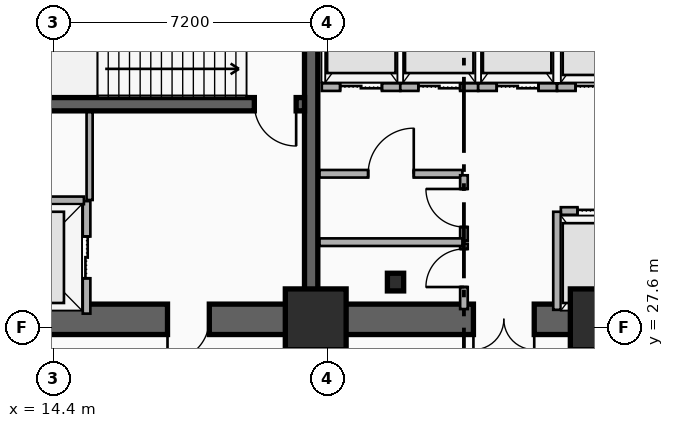
"""IFC4 building model, lengths in metres.
Left out: names, types, materials, properties, quantities, classifications, styles, units other than length and angle.
Written with IfcOpenShell. Run it as: python <this file> out.ifc"""

import sys

from ifc_helpers import new_model, si_unit, direction, frame, frame_2d, origin, origin_2d, place, context, subcontext, project, spatial, rectangle, i_section, extrude, element, fill, save


model = new_model("IFC4")
c1 = context("Model", 3, precision=1e-05, world=origin(), true_north=direction((0.0, 1.0)))
c2 = subcontext(c1, "Body", "Model", "MODEL_VIEW")
j1 = project(units=[si_unit("LENGTHUNIT", "METRE"), si_unit("PLANEANGLEUNIT", "RADIAN")], contexts=[c1])
p1 = place(None, origin())
s1 = spatial("IfcSite", under=j1, at=p1, CompositionType="ELEMENT")
p2 = place(p1, origin())
s2 = spatial("IfcBuilding", under=s1, at=p2, CompositionType="ELEMENT")
p3 = place(p2, origin())
s3 = spatial("IfcBuildingStorey", under=s2, at=p3, CompositionType="ELEMENT", Elevation=0.0)
p4 = place(p3, frame((21.18, 27.82, 0.0), z_axis=(0.0, 0.0, 1.0), x_axis=(-1.0, 0.0, 0.0)))
e1 = element("IfcWall", 1, at=p4, inside=s3, PredefinedType="SHEAR", context=c2, shape_type="SweptSolid", body=[
    extrude(rectangle(XDim=9.03, YDim=0.8, at=frame_2d((4.515, 0.0))), origin(), (0.0, 0.0, 1.0), 5.4),
])
p5 = place(p4, frame((2.68, 0.0, 0.0)))
e2 = element("IfcOpeningElement", 2, at=p5, cuts=e1, PredefinedType="OPENING", context=c2, shape_type="SweptSolid", body=[
    extrude(rectangle(XDim=1.1, YDim=2.15, at=frame_2d((0.55, 1.075))), frame((0.0, 0.41, 0.0), z_axis=(0.0, -1.0, 0.0), x_axis=(1.0, 0.0, 0.0)), (0.0, 0.0, 1.0), 0.82),
])
p6 = place(p3, frame((33.15, 27.82, 0.0), z_axis=(0.0, 0.0, 1.0), x_axis=(-1.0, 0.0, 0.0)))
e3 = element("IfcWall", 3, at=p6, inside=s3, PredefinedType="SHEAR", context=c2, shape_type="SweptSolid", body=[
    extrude(rectangle(XDim=11.97, YDim=0.8, at=frame_2d((5.985, 0.0))), origin(), (0.0, 0.0, 1.0), 5.4),
])
p7 = place(p6, frame((6.1, 0.0, 0.0)))
e4 = element("IfcOpeningElement", 4, at=p7, cuts=e3, PredefinedType="OPENING", context=c2, shape_type="SweptSolid", body=[
    extrude(rectangle(XDim=1.6, YDim=2.2, at=frame_2d((0.8, 1.1))), frame((0.0, 0.41, 0.0), z_axis=(0.0, -1.0, 0.0), x_axis=(1.0, 0.0, 0.0)), (0.0, 0.0, 1.0), 0.82),
])
p8 = place(p3, frame((21.18, 28.22, 0.0), z_axis=(0.0, 0.0, 1.0), x_axis=(0.0, 1.0, 0.0)))
e5 = element("IfcWall", 5, at=p8, inside=s3, PredefinedType="SHEAR", context=c2, shape_type="SweptSolid", body=[
    extrude(rectangle(XDim=8.43, YDim=0.35, at=frame_2d((4.215, 0.0))), origin(), (0.0, 0.0, 1.0), 5.4),
])
p9 = place(p3, frame((21.005, 33.48, 0.0), z_axis=(0.0, 0.0, 1.0), x_axis=(-1.0, 0.0, 0.0)))
e6 = element("IfcWall", 6, at=p9, inside=s3, PredefinedType="SHEAR", context=c2, shape_type="SweptSolid", body=[
    extrude(rectangle(XDim=8.455, YDim=0.35, at=frame_2d((4.228, 0.0))), origin(), (0.0, 0.0, 1.0), 5.4),
])
p10 = place(p9, frame((0.22, 0.0, 0.0)))
e7 = element("IfcOpeningElement", 7, at=p10, cuts=e6, PredefinedType="OPENING", context=c2, shape_type="SweptSolid", body=[
    extrude(rectangle(XDim=1.1, YDim=2.15, at=frame_2d((0.55, 1.075))), frame((0.0, 0.185, 0.0), z_axis=(0.0, -1.0, 0.0), x_axis=(1.0, 0.0, 0.0)), (0.0, 0.0, 1.0), 0.37),
])
p11 = place(p3, frame((23.4, 28.8, 0.0), z_axis=(0.0, 0.0, 1.0), x_axis=(1.0, 0.0, 0.0)))
e8 = element("IfcColumn", 8, at=p11, inside=s3, PredefinedType="COLUMN", context=c2, shape_type="SweptSolid", body=[
    extrude(i_section(OverallWidth=0.428, OverallDepth=0.465, WebThickness=0.045, FlangeThickness=0.073, FilletRadius=0.015, at=origin_2d()), origin(), (0.0, 0.0, 1.0), 5.4),
])
for number, where, z_axis, x_axis in (
    (9, (21.3, 27.82, 0.0), (0.0, 0.0, 1.0), (1.0, 0.0, 0.0)),
    (10, (28.8, 27.82, 0.0), (0.0, 0.0, 1.0), (1.0, 0.0, 0.0)),
):
    element("IfcColumn", number, at=place(p3, frame(where, z_axis=z_axis, x_axis=x_axis)), inside=s3, PredefinedType="COLUMN", context=c2, shape_type="SweptSolid", body=[
        extrude(rectangle(XDim=1.6, YDim=1.6, at=origin_2d()), origin(), (0.0, 0.0, 1.0), 5.4),
    ])
p12 = place(p3, frame((15.27, 27.97, 0.0), z_axis=(0.0, 0.0, 1.0), x_axis=(0.0, 1.0, 0.0)))
e11 = element("IfcWall", 11, at=p12, inside=s3, PredefinedType="PARTITIONING", context=c2, shape_type="SweptSolid", body=[
    extrude(rectangle(XDim=2.96, YDim=0.2, at=frame_2d((1.48, 0.0))), origin(), (0.0, 0.0, 1.0), 4.072),
])
p13 = place(p12, frame((0.93, 0.0, 0.0)))
e12 = element("IfcOpeningElement", 12, at=p13, cuts=e11, PredefinedType="OPENING", context=c2, shape_type="SweptSolid", body=[
    extrude(rectangle(XDim=1.1, YDim=2.15, at=frame_2d((0.55, 1.075))), frame((0.0, 0.11, 0.0), z_axis=(0.0, -1.0, 0.0), x_axis=(1.0, 0.0, 0.0)), (0.0, 0.0, 1.0), 0.22),
])
p14 = place(p3, frame((12.45, 30.95, 0.0), z_axis=(0.0, 0.0, 1.0), x_axis=(1.0, 0.0, 0.0)))
e13 = element("IfcWall", 13, at=p14, inside=s3, PredefinedType="PARTITIONING", context=c2, shape_type="SweptSolid", body=[
    extrude(rectangle(XDim=2.75, YDim=0.2, at=frame_2d((1.375, 0.0))), origin(), (0.0, 0.0, 1.0), 4.072),
])
p15 = place(p3, frame((27.75, 30.67, 0.0), z_axis=(0.0, 0.0, 1.0), x_axis=(1.0, 0.0, 0.0)))
e14 = element("IfcWall", 14, at=p15, inside=s3, PredefinedType="PARTITIONING", context=c2, shape_type="SweptSolid", body=[
    extrude(rectangle(XDim=1.975, YDim=0.2, at=frame_2d((0.988, 0.0))), origin(), (0.0, 0.0, 1.0), 4.072),
])
p16 = place(p15, frame((0.438, 0.0, 0.0)))
e15 = element("IfcOpeningElement", 15, at=p16, cuts=e14, PredefinedType="OPENING", context=c2, shape_type="SweptSolid", body=[
    extrude(rectangle(XDim=1.1, YDim=2.15, at=frame_2d((0.55, 1.075))), frame((0.0, 0.11, 0.0), z_axis=(0.0, -1.0, 0.0), x_axis=(1.0, 0.0, 0.0)), (0.0, 0.0, 1.0), 0.22),
])
p17 = place(p3, frame((27.65, 28.07, 0.0), z_axis=(0.0, 0.0, 1.0), x_axis=(0.0, 1.0, 0.0)))
e16 = element("IfcWall", 16, at=p17, inside=s3, PredefinedType="PARTITIONING", context=c2, shape_type="SweptSolid", body=[
    extrude(rectangle(XDim=2.58, YDim=0.2, at=frame_2d((1.29, 0.0))), origin(), (0.0, 0.0, 1.0), 4.072),
])
p18 = place(p3, frame((21.46, 33.93, 0.0), z_axis=(0.0, 0.0, 1.0), x_axis=(1.0, 0.0, 0.0)))
e17 = element("IfcWall", 17, at=p18, inside=s3, PredefinedType="PARTITIONING", context=c2, shape_type="SweptSolid", body=[
    extrude(rectangle(XDim=2.065, YDim=0.2, at=frame_2d((1.032, 0.0))), origin(), (0.0, 0.0, 1.0), 4.072),
])
p19 = place(p18, frame((0.482, 0.0, 0.0)))
e18 = element("IfcOpeningElement", 18, at=p19, cuts=e17, PredefinedType="OPENING", context=c2, shape_type="SweptSolid", body=[
    extrude(rectangle(XDim=1.1, YDim=2.15, at=frame_2d((0.55, 1.075))), frame((0.0, 0.11, 0.0), z_axis=(0.0, -1.0, 0.0), x_axis=(1.0, 0.0, 0.0)), (0.0, 0.0, 1.0), 0.22),
])
p20 = place(p3, frame((23.525, 33.93, 0.0), z_axis=(0.0, 0.0, 1.0), x_axis=(1.0, 0.0, 0.0)))
e19 = element("IfcWall", 19, at=p20, inside=s3, PredefinedType="PARTITIONING", context=c2, shape_type="SweptSolid", body=[
    extrude(rectangle(XDim=2.05, YDim=0.2, at=frame_2d((1.025, 0.0))), origin(), (0.0, 0.0, 1.0), 5.1),
])
p21 = place(p20, frame((0.475, 0.0, 0.0)))
e20 = element("IfcOpeningElement", 20, at=p21, cuts=e19, PredefinedType="OPENING", context=c2, shape_type="SweptSolid", body=[
    extrude(rectangle(XDim=1.1, YDim=2.15, at=frame_2d((0.55, 1.075))), frame((0.0, 0.11, 0.0), z_axis=(0.0, -1.0, 0.0), x_axis=(1.0, 0.0, 0.0)), (0.0, 0.0, 1.0), 0.22),
])
p22 = place(p3, frame((25.575, 33.93, 0.0), z_axis=(0.0, 0.0, 1.0), x_axis=(1.0, 0.0, 0.0)))
e21 = element("IfcWall", 21, at=p22, inside=s3, PredefinedType="PARTITIONING", context=c2, shape_type="SweptSolid", body=[
    extrude(rectangle(XDim=2.075, YDim=0.2, at=frame_2d((1.038, 0.0))), origin(), (0.0, 0.0, 1.0), 5.1),
])
p23 = place(p22, frame((0.488, 0.0, 0.0)))
e22 = element("IfcOpeningElement", 22, at=p23, cuts=e21, PredefinedType="OPENING", context=c2, shape_type="SweptSolid", body=[
    extrude(rectangle(XDim=1.1, YDim=2.15, at=frame_2d((0.55, 1.075))), frame((0.0, 0.11, 0.0), z_axis=(0.0, -1.0, 0.0), x_axis=(1.0, 0.0, 0.0)), (0.0, 0.0, 1.0), 0.22),
])
p24 = place(p3, frame((27.65, 33.93, 0.0), z_axis=(0.0, 0.0, 1.0), x_axis=(1.0, 0.0, 0.0)))
e23 = element("IfcWall", 23, at=p24, inside=s3, PredefinedType="PARTITIONING", context=c2, shape_type="SweptSolid", body=[
    extrude(rectangle(XDim=2.075, YDim=0.2, at=frame_2d((1.038, 0.0))), origin(), (0.0, 0.0, 1.0), 4.072),
])
p25 = place(p24, frame((0.488, 0.0, 0.0)))
e24 = element("IfcOpeningElement", 24, at=p25, cuts=e23, PredefinedType="OPENING", context=c2, shape_type="SweptSolid", body=[
    extrude(rectangle(XDim=1.1, YDim=2.15, at=frame_2d((0.55, 1.075))), frame((0.0, 0.11, 0.0), z_axis=(0.0, -1.0, 0.0), x_axis=(1.0, 0.0, 0.0)), (0.0, 0.0, 1.0), 0.22),
])
p26 = place(p3, frame((21.4, 31.65, 0.0), z_axis=(0.0, 0.0, 1.0), x_axis=(1.0, 0.0, 0.0)))
e25 = element("IfcWall", 25, at=p26, inside=s3, PredefinedType="PARTITIONING", context=c2, shape_type="SweptSolid", body=[
    extrude(rectangle(XDim=3.76, YDim=0.2, at=frame_2d((1.88, 0.0))), origin(), (0.0, 0.0, 1.0), 4.072),
])
p27 = place(p26, frame((1.28, 0.0, 0.0)))
e26 = element("IfcOpeningElement", 26, at=p27, cuts=e25, PredefinedType="OPENING", context=c2, shape_type="SweptSolid", body=[
    extrude(rectangle(XDim=1.2, YDim=2.15, at=frame_2d((0.6, 1.075))), frame((0.0, 0.11, 0.0), z_axis=(0.0, -1.0, 0.0), x_axis=(1.0, 0.0, 0.0)), (0.0, 0.0, 1.0), 0.22),
])
p28 = place(p3, frame((25.2, 28.09, 0.0), z_axis=(0.0, 0.0, 1.0), x_axis=(0.0, 1.0, 0.0)))
e27 = element("IfcWall", 27, at=p28, inside=s3, PredefinedType="PARTITIONING", context=c2, shape_type="SweptSolid", body=[
    extrude(rectangle(XDim=1.72, YDim=0.2, at=frame_2d((0.86, 0.0))), origin(), (0.0, 0.0, 1.0), 5.1),
])
p29 = place(p28, frame((0.58, 0.0, 0.0)))
e28 = element("IfcOpeningElement", 28, at=p29, cuts=e27, PredefinedType="OPENING", context=c2, shape_type="SweptSolid", body=[
    extrude(rectangle(XDim=1.0, YDim=2.15, at=frame_2d((0.5, 1.075))), frame((0.0, 0.11, 0.0), z_axis=(0.0, -1.0, 0.0), x_axis=(1.0, 0.0, 0.0)), (0.0, 0.0, 1.0), 0.22),
])
p30 = place(p3, frame((25.2, 29.89, 0.0), z_axis=(0.0, 0.0, 1.0), x_axis=(0.0, 1.0, 0.0)))
e29 = element("IfcWall", 29, at=p30, inside=s3, PredefinedType="PARTITIONING", context=c2, shape_type="SweptSolid", body=[
    extrude(rectangle(XDim=1.72, YDim=0.2, at=frame_2d((0.86, 0.0))), origin(), (0.0, 0.0, 1.0), 5.1),
])
p31 = place(p30, frame((0.36, 0.0, 0.0)))
e30 = element("IfcOpeningElement", 30, at=p31, cuts=e29, PredefinedType="OPENING", context=c2, shape_type="SweptSolid", body=[
    extrude(rectangle(XDim=1.0, YDim=2.15, at=frame_2d((0.5, 1.075))), frame((0.0, 0.11, 0.0), z_axis=(0.0, -1.0, 0.0), x_axis=(1.0, 0.0, 0.0)), (0.0, 0.0, 1.0), 0.22),
])
p32 = place(p3, frame((21.4, 29.85, 0.0), z_axis=(0.0, 0.0, 1.0), x_axis=(1.0, 0.0, 0.0)))
e31 = element("IfcWall", 31, at=p32, inside=s3, PredefinedType="PARTITIONING", context=c2, shape_type="SweptSolid", body=[
    extrude(rectangle(XDim=3.76, YDim=0.2, at=frame_2d((1.88, 0.0))), origin(), (0.0, 0.0, 1.0), 4.072),
])
p33 = place(p3, frame((15.35, 30.96, 0.0), z_axis=(0.0, 0.0, 1.0), x_axis=(0.0, 1.0, 0.0)))
e32 = element("IfcWall", 32, at=p33, inside=s3, PredefinedType="PARTITIONING", context=c2, shape_type="SweptSolid", body=[
    extrude(rectangle(XDim=2.31, YDim=0.16, at=frame_2d((1.155, 0.0))), origin(), (0.0, 0.0, 1.0), 5.1),
])
p34 = place(p13, origin())
e33 = element("IfcDoor", 33, at=p34, inside=s3, OperationType="DOUBLE_DOOR_SLIDING", PredefinedType="DOOR", context=c2, shape_type="SweptSolid", body=[
    extrude(rectangle(XDim=1.1, YDim=2.15, at=frame_2d((0.55, 1.075))), frame((0.0, 0.025, 0.0), z_axis=(0.0, -1.0, 0.0), x_axis=(1.0, 0.0, 0.0)), (0.0, 0.0, 1.0), 0.05),
])
fill(e12, e33)
p35 = place(p16, origin())
e34 = element("IfcDoor", 34, at=p35, inside=s3, OperationType="DOUBLE_DOOR_SLIDING", PredefinedType="DOOR", context=c2, shape_type="SweptSolid", body=[
    extrude(rectangle(XDim=1.1, YDim=2.15, at=frame_2d((0.55, 1.075))), frame((0.0, 0.025, 0.0), z_axis=(0.0, -1.0, 0.0), x_axis=(1.0, 0.0, 0.0)), (0.0, 0.0, 1.0), 0.05),
])
fill(e15, e34)
p36 = place(p19, origin())
e35 = element("IfcDoor", 35, at=p36, inside=s3, OperationType="DOUBLE_DOOR_SLIDING", PredefinedType="DOOR", context=c2, shape_type="SweptSolid", body=[
    extrude(rectangle(XDim=1.1, YDim=2.15, at=frame_2d((0.55, 1.075))), frame((0.0, 0.025, 0.0), z_axis=(0.0, -1.0, 0.0), x_axis=(1.0, 0.0, 0.0)), (0.0, 0.0, 1.0), 0.05),
])
fill(e18, e35)
p37 = place(p21, origin())
e36 = element("IfcDoor", 36, at=p37, inside=s3, OperationType="DOUBLE_DOOR_SLIDING", PredefinedType="DOOR", context=c2, shape_type="SweptSolid", body=[
    extrude(rectangle(XDim=1.1, YDim=2.15, at=frame_2d((0.55, 1.075))), frame((0.0, 0.025, 0.0), z_axis=(0.0, -1.0, 0.0), x_axis=(1.0, 0.0, 0.0)), (0.0, 0.0, 1.0), 0.05),
])
fill(e20, e36)
p38 = place(p23, origin())
e37 = element("IfcDoor", 37, at=p38, inside=s3, OperationType="DOUBLE_DOOR_SLIDING", PredefinedType="DOOR", context=c2, shape_type="SweptSolid", body=[
    extrude(rectangle(XDim=1.1, YDim=2.15, at=frame_2d((0.55, 1.075))), frame((0.0, 0.025, 0.0), z_axis=(0.0, -1.0, 0.0), x_axis=(1.0, 0.0, 0.0)), (0.0, 0.0, 1.0), 0.05),
])
fill(e22, e37)
p39 = place(p25, origin())
e38 = element("IfcDoor", 38, at=p39, inside=s3, OperationType="DOUBLE_DOOR_SLIDING", PredefinedType="DOOR", context=c2, shape_type="SweptSolid", body=[
    extrude(rectangle(XDim=1.1, YDim=2.15, at=frame_2d((0.55, 1.075))), frame((0.0, 0.025, 0.0), z_axis=(0.0, -1.0, 0.0), x_axis=(1.0, 0.0, 0.0)), (0.0, 0.0, 1.0), 0.05),
])
fill(e24, e38)
p40 = place(p10, origin())
e39 = element("IfcDoor", 39, at=p40, inside=s3, OperationType="SINGLE_SWING_LEFT", PredefinedType="DOOR", context=c2, shape_type="SweptSolid", body=[
    extrude(rectangle(XDim=1.1, YDim=2.15, at=frame_2d((0.55, 1.075))), frame((0.0, 0.025, 0.0), z_axis=(0.0, -1.0, 0.0), x_axis=(1.0, 0.0, 0.0)), (0.0, 0.0, 1.0), 0.05),
])
fill(e7, e39)
p41 = place(p5, origin())
e40 = element("IfcDoor", 40, at=p41, inside=s3, OperationType="SINGLE_SWING_RIGHT", PredefinedType="DOOR", context=c2, shape_type="SweptSolid", body=[
    extrude(rectangle(XDim=1.1, YDim=2.15, at=frame_2d((0.55, 1.075))), frame((0.0, 0.025, 0.0), z_axis=(0.0, -1.0, 0.0), x_axis=(1.0, 0.0, 0.0)), (0.0, 0.0, 1.0), 0.05),
])
fill(e2, e40)
p42 = place(p7, origin())
e41 = element("IfcDoor", 41, at=p42, inside=s3, OperationType="SINGLE_SWING_LEFT", PredefinedType="DOOR", context=c2, shape_type="SweptSolid", body=[
    extrude(rectangle(XDim=1.6, YDim=2.2, at=frame_2d((0.8, 1.1))), frame((0.0, 0.025, 0.0), z_axis=(0.0, -1.0, 0.0), x_axis=(1.0, 0.0, 0.0)), (0.0, 0.0, 1.0), 0.05),
])
fill(e4, e41)
p43 = place(p27, origin())
e42 = element("IfcDoor", 42, at=p43, inside=s3, OperationType="SINGLE_SWING_RIGHT", PredefinedType="DOOR", context=c2, shape_type="SweptSolid", body=[
    extrude(rectangle(XDim=1.2, YDim=2.15, at=frame_2d((0.6, 1.075))), frame((0.0, 0.025, 0.0), z_axis=(0.0, -1.0, 0.0), x_axis=(1.0, 0.0, 0.0)), (0.0, 0.0, 1.0), 0.05),
])
fill(e26, e42)
p44 = place(p29, origin())
e43 = element("IfcDoor", 43, at=p44, inside=s3, OperationType="SINGLE_SWING_LEFT", PredefinedType="DOOR", context=c2, shape_type="SweptSolid", body=[
    extrude(rectangle(XDim=1.0, YDim=2.15, at=frame_2d((0.5, 1.075))), frame((0.0, 0.025, 0.0), z_axis=(0.0, -1.0, 0.0), x_axis=(1.0, 0.0, 0.0)), (0.0, 0.0, 1.0), 0.05),
])
fill(e28, e43)
p45 = place(p31, origin())
e44 = element("IfcDoor", 44, at=p45, inside=s3, OperationType="SINGLE_SWING_RIGHT", PredefinedType="DOOR", context=c2, shape_type="SweptSolid", body=[
    extrude(rectangle(XDim=1.0, YDim=2.15, at=frame_2d((0.5, 1.075))), frame((0.0, 0.025, 0.0), z_axis=(0.0, -1.0, 0.0), x_axis=(1.0, 0.0, 0.0)), (0.0, 0.0, 1.0), 0.05),
])
fill(e30, e44)
save(model, sys.argv[1])
